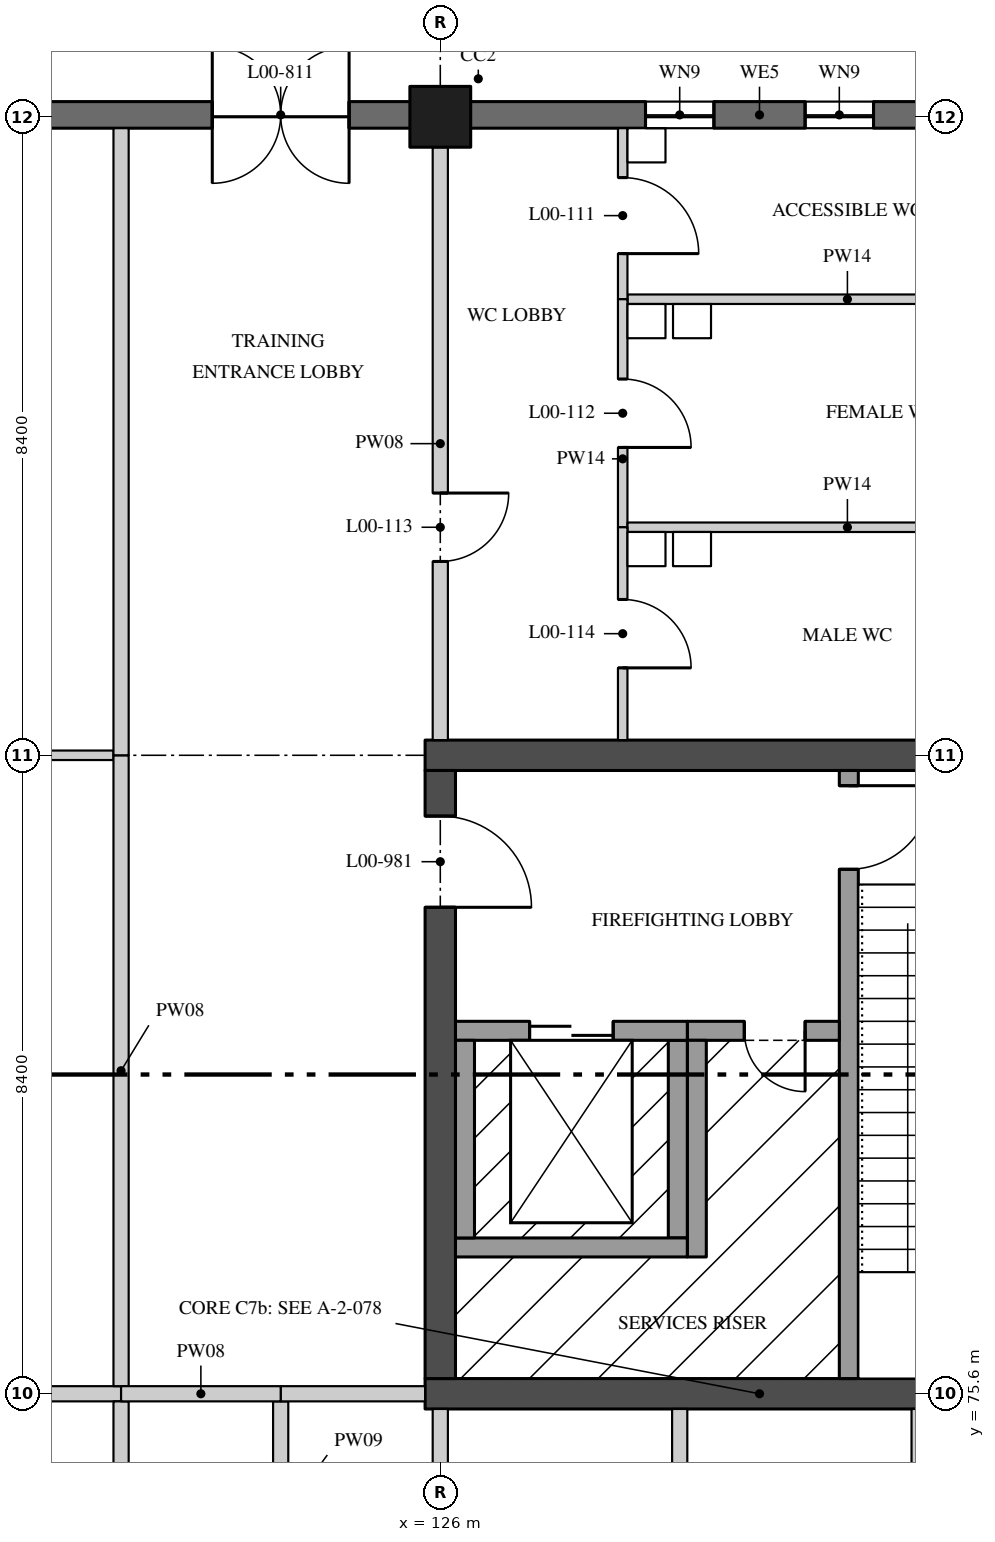
"""IFC4 building model, lengths in metres.
Left out: names, types, materials, properties, quantities, classifications, styles, units other than length and angle.
Written with IfcOpenShell. Run it as: python <this file> out.ifc"""

import sys

from ifc_helpers import new_model, si_unit, direction, frame, frame_2d, origin, origin_2d, place, context, subcontext, project, spatial, rectangle, extrude, element, fill, save


model = new_model("IFC4")
c1 = context("Model", 3, precision=1e-05, world=origin(), true_north=direction((0.0, 1.0)))
c2 = subcontext(c1, "Body", "Model", "MODEL_VIEW")
j1 = project(units=[si_unit("LENGTHUNIT", "METRE"), si_unit("PLANEANGLEUNIT", "RADIAN")], contexts=[c1])
p1 = place(None, origin())
s1 = spatial("IfcSite", under=j1, at=p1, CompositionType="ELEMENT")
p2 = place(p1, origin())
s2 = spatial("IfcBuilding", under=s1, at=p2, CompositionType="ELEMENT")
p3 = place(p2, origin())
s3 = spatial("IfcBuildingStorey", under=s2, at=p3, CompositionType="ELEMENT", Elevation=0.0)
p4 = place(p3, frame((126.0, 92.4, 0.0), z_axis=(0.0, 0.0, 1.0), x_axis=(1.0, 0.0, 0.0)))
e1 = element("IfcColumn", 1, at=p4, inside=s3, PredefinedType="COLUMN", context=c2, shape_type="SweptSolid", body=[
    extrude(rectangle(XDim=0.8, YDim=0.8, at=origin_2d()), origin(), (0.0, 0.0, 1.0), 5.05),
])
for number, where, z_axis, x_axis in (
    (2, (125.8, 75.6, 0.0), (0.0, 0.0, 1.0), (1.0, 0.0, 0.0)),
    (3, (125.8, 84.0, 0.0), (0.0, 0.0, 1.0), (1.0, 0.0, 0.0)),
):
    element("IfcWall", number, at=place(p3, frame(where, z_axis=z_axis, x_axis=x_axis)), inside=s3, PredefinedType="SHEAR", context=c2, shape_type="SweptSolid", body=[
        extrude(rectangle(XDim=8.8, YDim=0.4, at=frame_2d((4.4, 0.0))), origin(), (0.0, 0.0, 1.0), 5.05),
    ])
p5 = place(p3, frame((126.0, 75.8, 0.0), z_axis=(0.0, 0.0, 1.0), x_axis=(0.0, 1.0, 0.0)))
e4 = element("IfcWall", 4, at=p5, inside=s3, PredefinedType="SHEAR", context=c2, shape_type="SweptSolid", body=[
    extrude(rectangle(XDim=8.0, YDim=0.4, at=frame_2d((4.0, 0.0))), origin(), (0.0, 0.0, 1.0), 5.05),
])
p6 = place(p5, frame((6.2, 0.0, 0.0)))
e5 = element("IfcOpeningElement", 5, at=p6, cuts=e4, PredefinedType="OPENING", context=c2, shape_type="SweptSolid", body=[
    extrude(rectangle(XDim=1.2, YDim=2.1, at=frame_2d((0.6, 1.05))), frame((0.0, 0.21, 0.0), z_axis=(0.0, -1.0, 0.0), x_axis=(1.0, 0.0, 0.0)), (0.0, 0.0, 1.0), 0.42),
])
p7 = place(p3, frame((131.375, 83.8, 0.0), z_axis=(0.0, 0.0, 1.0), x_axis=(0.0, -1.0, 0.0)))
e6 = element("IfcWall", 6, at=p7, inside=s3, PredefinedType="SOLIDWALL", context=c2, shape_type="SweptSolid", body=[
    extrude(rectangle(XDim=8.0, YDim=0.25, at=frame_2d((4.0, 0.0))), origin(), (0.0, 0.0, 1.0), 5.05),
])
p8 = place(p7, frame((0.2, 0.0, 0.0)))
e7 = element("IfcOpeningElement", 7, at=p8, cuts=e6, PredefinedType="OPENING", context=c2, shape_type="SweptSolid", body=[
    extrude(rectangle(XDim=1.1, YDim=2.1, at=frame_2d((0.55, 1.05))), frame((0.0, 0.135, 0.0), z_axis=(0.0, -1.0, 0.0), x_axis=(1.0, 0.0, 0.0)), (0.0, 0.0, 1.0), 0.27),
])
p9 = place(p3, frame((131.25, 80.375, 0.0), z_axis=(0.0, 0.0, 1.0), x_axis=(-1.0, 0.0, 0.0)))
e8 = element("IfcWall", 8, at=p9, inside=s3, PredefinedType="SOLIDWALL", context=c2, shape_type="SweptSolid", body=[
    extrude(rectangle(XDim=2.0, YDim=0.25, at=frame_2d((1.0, 0.0))), origin(), (0.0, 0.0, 1.0), 5.05),
])
p10 = place(p9, frame((0.45, 0.0, 0.0)))
e9 = element("IfcOpeningElement", 9, at=p10, cuts=e8, PredefinedType="OPENING", context=c2, shape_type="SweptSolid", body=[
    extrude(rectangle(XDim=0.8, YDim=2.1, at=frame_2d((0.4, 1.05))), frame((0.0, 0.135, 0.0), z_axis=(0.0, -1.0, 0.0), x_axis=(1.0, 0.0, 0.0)), (0.0, 0.0, 1.0), 0.27),
])
p11 = place(p3, frame((129.375, 80.25, 0.0), z_axis=(0.0, 0.0, 1.0), x_axis=(0.0, -1.0, 0.0)))
e10 = element("IfcWall", 10, at=p11, inside=s3, PredefinedType="SOLIDWALL", context=c2, shape_type="SweptSolid", body=[
    extrude(rectangle(XDim=2.85, YDim=0.25, at=frame_2d((1.425, 0.0))), origin(), (0.0, 0.0, 1.0), 5.05),
])
p12 = place(p3, frame((129.125, 77.65, 0.0), z_axis=(0.0, 0.0, 1.0), x_axis=(0.0, 1.0, 0.0)))
e11 = element("IfcWall", 11, at=p12, inside=s3, PredefinedType="SOLIDWALL", context=c2, shape_type="SweptSolid", body=[
    extrude(rectangle(XDim=2.6, YDim=0.25, at=frame_2d((1.3, 0.0))), origin(), (0.0, 0.0, 1.0), 5.05),
])
p13 = place(p3, frame((126.2, 80.375, 0.0), z_axis=(0.0, 0.0, 1.0), x_axis=(1.0, 0.0, 0.0)))
e12 = element("IfcWall", 12, at=p13, inside=s3, PredefinedType="SOLIDWALL", context=c2, shape_type="SweptSolid", body=[
    extrude(rectangle(XDim=3.05, YDim=0.25, at=frame_2d((1.525, 0.0))), origin(), (0.0, 0.0, 1.0), 5.05),
])
p14 = place(p13, frame((0.975, 0.0, 0.0)))
e13 = element("IfcOpeningElement", 13, at=p14, cuts=e12, PredefinedType="OPENING", context=c2, shape_type="SweptSolid", body=[
    extrude(rectangle(XDim=1.1, YDim=2.1, at=frame_2d((0.55, 1.05))), frame((0.0, 0.135, 0.0), z_axis=(0.0, -1.0, 0.0), x_axis=(1.0, 0.0, 0.0)), (0.0, 0.0, 1.0), 0.27),
])
p15 = place(p3, frame((126.2, 77.525, 0.0), z_axis=(0.0, 0.0, 1.0), x_axis=(1.0, 0.0, 0.0)))
e14 = element("IfcWall", 14, at=p15, inside=s3, PredefinedType="SOLIDWALL", context=c2, shape_type="SweptSolid", body=[
    extrude(rectangle(XDim=3.05, YDim=0.25, at=frame_2d((1.525, 0.0))), origin(), (0.0, 0.0, 1.0), 5.05),
])
p16 = place(p3, frame((126.325, 77.65, 0.0), z_axis=(0.0, 0.0, 1.0), x_axis=(0.0, 1.0, 0.0)))
e15 = element("IfcWall", 15, at=p16, inside=s3, PredefinedType="SOLIDWALL", context=c2, shape_type="SweptSolid", body=[
    extrude(rectangle(XDim=2.6, YDim=0.25, at=frame_2d((1.3, 0.0))), origin(), (0.0, 0.0, 1.0), 5.05),
])
p17 = place(p3, frame((119.7, 75.6, 0.0), z_axis=(0.0, 0.0, 1.0), x_axis=(1.0, 0.0, 0.0)))
e16 = element("IfcWall", 16, at=p17, inside=s3, PredefinedType="PARTITIONING", context=c2, shape_type="SweptSolid", body=[
    extrude(rectangle(XDim=2.1, YDim=0.2, at=frame_2d((1.05, 0.0))), origin(), (0.0, 0.0, 1.0), 5.05),
])
p18 = place(p3, frame((118.0, 84.0, 0.0), z_axis=(0.0, 0.0, 1.0), x_axis=(1.0, 0.0, 0.0)))
e17 = element("IfcWall", 17, at=p18, inside=s3, PredefinedType="PARTITIONING", context=c2, shape_type="SweptSolid", body=[
    extrude(rectangle(XDim=3.7, YDim=0.125, at=frame_2d((1.85, 0.0))), origin(), (0.0, 0.0, 1.0), 5.05),
])
p19 = place(p3, frame((121.8, 75.7, 0.0), z_axis=(0.0, 0.0, 1.0), x_axis=(0.0, 1.0, 0.0)))
e18 = element("IfcWall", 18, at=p19, inside=s3, PredefinedType="PARTITIONING", context=c2, shape_type="SweptSolid", body=[
    extrude(rectangle(XDim=8.3, YDim=0.2, at=frame_2d((4.15, 0.0))), origin(), (0.0, 0.0, 1.0), 5.05),
])
p20 = place(p3, frame((123.9, 72.4, 0.0), z_axis=(0.0, 0.0, 1.0), x_axis=(0.0, 1.0, 0.0)))
e19 = element("IfcWall", 19, at=p20, inside=s3, PredefinedType="PARTITIONING", context=c2, shape_type="SweptSolid", body=[
    extrude(rectangle(XDim=3.1, YDim=0.2, at=frame_2d((1.55, 0.0))), origin(), (0.0, 0.0, 1.0), 5.05),
])
p21 = place(p3, frame((126.0, 72.4, 0.0), z_axis=(0.0, 0.0, 1.0), x_axis=(0.0, 1.0, 0.0)))
e20 = element("IfcWall", 20, at=p21, inside=s3, PredefinedType="PARTITIONING", context=c2, shape_type="SweptSolid", body=[
    extrude(rectangle(XDim=3.0, YDim=0.2, at=frame_2d((1.5, 0.0))), origin(), (0.0, 0.0, 1.0), 5.05),
])
p22 = place(p3, frame((123.9, 75.6, 0.0), z_axis=(0.0, 0.0, 1.0), x_axis=(1.0, 0.0, 0.0)))
e21 = element("IfcWall", 21, at=p22, inside=s3, PredefinedType="PARTITIONING", context=c2, shape_type="SweptSolid", body=[
    extrude(rectangle(XDim=1.9, YDim=0.2, at=frame_2d((0.95, 0.0))), origin(), (0.0, 0.0, 1.0), 5.05),
])
p23 = place(p3, frame((121.8, 72.4, 0.0), z_axis=(0.0, 0.0, 1.0), x_axis=(0.0, 1.0, 0.0)))
e22 = element("IfcWall", 22, at=p23, inside=s3, PredefinedType="PARTITIONING", context=c2, shape_type="SweptSolid", body=[
    extrude(rectangle(XDim=3.1, YDim=0.2, at=frame_2d((1.55, 0.0))), origin(), (0.0, 0.0, 1.0), 5.05),
])
p24 = place(p3, frame((121.8, 75.6, 0.0), z_axis=(0.0, 0.0, 1.0), x_axis=(1.0, 0.0, 0.0)))
e23 = element("IfcWall", 23, at=p24, inside=s3, PredefinedType="PARTITIONING", context=c2, shape_type="SweptSolid", body=[
    extrude(rectangle(XDim=2.1, YDim=0.2, at=frame_2d((1.05, 0.0))), origin(), (0.0, 0.0, 1.0), 5.05),
])
for number, where, z_axis, x_axis in (
    (24, (129.15, 72.4, 0.0), (0.0, 0.0, 1.0), (0.0, 1.0, 0.0)),
    (25, (132.3, 72.4, 0.0), (0.0, 0.0, 1.0), (0.0, 1.0, 0.0)),
):
    element("IfcWall", number, at=place(p3, frame(where, z_axis=z_axis, x_axis=x_axis)), inside=s3, PredefinedType="PARTITIONING", context=c2, shape_type="SweptSolid", body=[
        extrude(rectangle(XDim=3.0, YDim=0.2, at=frame_2d((1.5, 0.0))), origin(), (0.0, 0.0, 1.0), 5.05),
    ])
p25 = place(p3, frame((121.8, 84.0, 0.0), z_axis=(0.0, 0.0, 1.0), x_axis=(0.0, 1.0, 0.0)))
e26 = element("IfcWall", 26, at=p25, inside=s3, PredefinedType="PARTITIONING", context=c2, shape_type="SweptSolid", body=[
    extrude(rectangle(XDim=8.25, YDim=0.2, at=frame_2d((4.125, 0.0))), origin(), (0.0, 0.0, 1.0), 5.05),
])
p26 = place(p3, frame((126.0, 84.2, 0.0), z_axis=(0.0, 0.0, 1.0), x_axis=(0.0, 1.0, 0.0)))
e27 = element("IfcWall", 27, at=p26, inside=s3, PredefinedType="PARTITIONING", context=c2, shape_type="SweptSolid", body=[
    extrude(rectangle(XDim=7.8, YDim=0.2, at=frame_2d((3.9, 0.0))), origin(), (0.0, 0.0, 1.0), 5.05),
])
p27 = place(p26, frame((2.35, 0.0, 0.0)))
e28 = element("IfcOpeningElement", 28, at=p27, cuts=e27, PredefinedType="OPENING", context=c2, shape_type="SweptSolid", body=[
    extrude(rectangle(XDim=0.9, YDim=2.1, at=frame_2d((0.45, 1.05))), frame((0.0, 0.11, 0.0), z_axis=(0.0, -1.0, 0.0), x_axis=(1.0, 0.0, 0.0)), (0.0, 0.0, 1.0), 0.22),
])
p28 = place(p3, frame((128.463, 90.0, 0.0), z_axis=(0.0, 0.0, 1.0), x_axis=(1.0, 0.0, 0.0)))
e29 = element("IfcWall", 29, at=p28, inside=s3, PredefinedType="PARTITIONING", context=c2, shape_type="SweptSolid", body=[
    extrude(rectangle(XDim=5.787, YDim=0.125, at=frame_2d((2.894, 0.0))), origin(), (0.0, 0.0, 1.0), 5.05),
])
p29 = place(p3, frame((128.4, 90.0, 0.0), z_axis=(0.0, 0.0, 1.0), x_axis=(0.0, 1.0, 0.0)))
e30 = element("IfcWall", 30, at=p29, inside=s3, PredefinedType="PARTITIONING", context=c2, shape_type="SweptSolid", body=[
    extrude(rectangle(XDim=2.25, YDim=0.125, at=frame_2d((1.125, 0.0))), origin(), (0.0, 0.0, 1.0), 5.05),
])
p30 = place(p29, frame((0.6, 0.0, 0.0)))
e31 = element("IfcOpeningElement", 31, at=p30, cuts=e30, PredefinedType="OPENING", context=c2, shape_type="SweptSolid", body=[
    extrude(rectangle(XDim=1.0, YDim=2.1, at=frame_2d((0.5, 1.05))), frame((0.0, 0.073, 0.0), z_axis=(0.0, -1.0, 0.0), x_axis=(1.0, 0.0, 0.0)), (0.0, 0.0, 1.0), 0.145),
])
p31 = place(p3, frame((128.4, 87.0, 0.0), z_axis=(0.0, 0.0, 1.0), x_axis=(0.0, 1.0, 0.0)))
e32 = element("IfcWall", 32, at=p31, inside=s3, PredefinedType="PARTITIONING", context=c2, shape_type="SweptSolid", body=[
    extrude(rectangle(XDim=3.0, YDim=0.125, at=frame_2d((1.5, 0.0))), origin(), (0.0, 0.0, 1.0), 5.05),
])
p32 = place(p31, frame((1.05, 0.0, 0.0)))
e33 = element("IfcOpeningElement", 33, at=p32, cuts=e32, PredefinedType="OPENING", context=c2, shape_type="SweptSolid", body=[
    extrude(rectangle(XDim=0.9, YDim=2.1, at=frame_2d((0.45, 1.05))), frame((0.0, 0.073, 0.0), z_axis=(0.0, -1.0, 0.0), x_axis=(1.0, 0.0, 0.0)), (0.0, 0.0, 1.0), 0.145),
])
p33 = place(p3, frame((128.463, 87.0, 0.0), z_axis=(0.0, 0.0, 1.0), x_axis=(1.0, 0.0, 0.0)))
e34 = element("IfcWall", 34, at=p33, inside=s3, PredefinedType="PARTITIONING", context=c2, shape_type="SweptSolid", body=[
    extrude(rectangle(XDim=5.787, YDim=0.125, at=frame_2d((2.894, 0.0))), origin(), (0.0, 0.0, 1.0), 5.05),
])
p34 = place(p3, frame((128.4, 84.2, 0.0), z_axis=(0.0, 0.0, 1.0), x_axis=(0.0, 1.0, 0.0)))
e35 = element("IfcWall", 35, at=p34, inside=s3, PredefinedType="PARTITIONING", context=c2, shape_type="SweptSolid", body=[
    extrude(rectangle(XDim=2.8, YDim=0.125, at=frame_2d((1.4, 0.0))), origin(), (0.0, 0.0, 1.0), 5.05),
])
p35 = place(p34, frame((0.95, 0.0, 0.0)))
e36 = element("IfcOpeningElement", 36, at=p35, cuts=e35, PredefinedType="OPENING", context=c2, shape_type="SweptSolid", body=[
    extrude(rectangle(XDim=0.9, YDim=2.1, at=frame_2d((0.45, 1.05))), frame((0.0, 0.073, 0.0), z_axis=(0.0, -1.0, 0.0), x_axis=(1.0, 0.0, 0.0)), (0.0, 0.0, 1.0), 0.145),
])
p36 = place(p3, frame((134.02, 92.425, 0.0), z_axis=(0.0, 0.0, 1.0), x_axis=(-1.0, 0.0, 0.0)))
e37 = element("IfcWall", 37, at=p36, inside=s3, PredefinedType="SOLIDWALL", context=c2, shape_type="SweptSolid", body=[
    extrude(rectangle(XDim=7.64, YDim=0.35, at=frame_2d((3.82, 0.0))), origin(), (0.0, 0.0, 1.0), 5.05),
])
p37 = place(p36, frame((2.32, 0.0, 1.5)))
e38 = element("IfcOpeningElement", 38, at=p37, cuts=e37, PredefinedType="OPENING", context=c2, shape_type="SweptSolid", body=[
    extrude(rectangle(XDim=0.9, YDim=1.2, at=frame_2d((0.45, 0.6))), frame((0.0, 0.185, 0.0), z_axis=(0.0, -1.0, 0.0), x_axis=(1.0, 0.0, 0.0)), (0.0, 0.0, 1.0), 0.37),
])
p38 = place(p36, frame((4.42, 0.0, 1.5)))
e39 = element("IfcOpeningElement", 39, at=p38, cuts=e37, PredefinedType="OPENING", context=c2, shape_type="SweptSolid", body=[
    extrude(rectangle(XDim=0.9, YDim=1.2, at=frame_2d((0.45, 0.6))), frame((0.0, 0.185, 0.0), z_axis=(0.0, -1.0, 0.0), x_axis=(1.0, 0.0, 0.0)), (0.0, 0.0, 1.0), 0.37),
])
p39 = place(p3, frame((125.62, 92.425, 0.0), z_axis=(0.0, 0.0, 1.0), x_axis=(-1.0, 0.0, 0.0)))
e40 = element("IfcWall", 40, at=p39, inside=s3, PredefinedType="SOLIDWALL", context=c2, shape_type="SweptSolid", body=[
    extrude(rectangle(XDim=7.64, YDim=0.35, at=frame_2d((3.82, 0.0))), origin(), (0.0, 0.0, 1.0), 5.05),
])
p40 = place(p39, frame((0.82, 0.0, 0.0)))
e41 = element("IfcOpeningElement", 41, at=p40, cuts=e40, PredefinedType="OPENING", context=c2, shape_type="SweptSolid", body=[
    extrude(rectangle(XDim=1.8, YDim=2.4, at=frame_2d((0.9, 1.2))), frame((0.0, 0.185, 0.0), z_axis=(0.0, -1.0, 0.0), x_axis=(1.0, 0.0, 0.0)), (0.0, 0.0, 1.0), 0.37),
])
p41 = place(p6, frame((1.2, 0.0, 0.0), z_axis=(0.0, 0.0, 1.0), x_axis=(-1.0, 0.0, 0.0)))
e42 = element("IfcDoor", 42, at=p41, inside=s3, OperationType="SINGLE_SWING_LEFT", PredefinedType="DOOR", context=c2, shape_type="SweptSolid", body=[
    extrude(rectangle(XDim=1.2, YDim=2.1, at=frame_2d((0.6, 1.05))), frame((0.0, 0.035, 0.0), z_axis=(0.0, -1.0, 0.0), x_axis=(1.0, 0.0, 0.0)), (0.0, 0.0, 1.0), 0.07),
])
fill(e5, e42)
p42 = place(p10, origin())
e43 = element("IfcDoor", 43, at=p42, inside=s3, OperationType="SINGLE_SWING_RIGHT", PredefinedType="DOOR", context=c2, shape_type="SweptSolid", body=[
    extrude(rectangle(XDim=0.8, YDim=2.1, at=frame_2d((0.4, 1.05))), frame((0.0, 0.035, 0.0), z_axis=(0.0, -1.0, 0.0), x_axis=(1.0, 0.0, 0.0)), (0.0, 0.0, 1.0), 0.07),
])
fill(e9, e43)
p43 = place(p8, origin())
e44 = element("IfcDoor", 44, at=p43, inside=s3, OperationType="SINGLE_SWING_RIGHT", PredefinedType="DOOR", context=c2, shape_type="SweptSolid", body=[
    extrude(rectangle(XDim=1.1, YDim=2.1, at=frame_2d((0.55, 1.05))), frame((0.0, 0.035, 0.0), z_axis=(0.0, -1.0, 0.0), x_axis=(1.0, 0.0, 0.0)), (0.0, 0.0, 1.0), 0.07),
])
fill(e7, e44)
p44 = place(p14, origin())
e45 = element("IfcDoor", 45, at=p44, inside=s3, OperationType="DOUBLE_DOOR_SLIDING", PredefinedType="DOOR", context=c2, shape_type="SweptSolid", body=[
    extrude(rectangle(XDim=1.1, YDim=2.1, at=frame_2d((0.55, 1.05))), frame((0.0, 0.04, 0.0), z_axis=(0.0, -1.0, 0.0), x_axis=(1.0, 0.0, 0.0)), (0.0, 0.0, 1.0), 0.08),
])
fill(e13, e45)
p45 = place(p30, frame((1.0, 0.0, 0.0), z_axis=(0.0, 0.0, 1.0), x_axis=(-1.0, 0.0, 0.0)))
e46 = element("IfcDoor", 46, at=p45, inside=s3, OperationType="SINGLE_SWING_LEFT", PredefinedType="DOOR", context=c2, shape_type="SweptSolid", body=[
    extrude(rectangle(XDim=1.0, YDim=2.1, at=frame_2d((0.5, 1.05))), frame((0.0, 0.02, 0.0), z_axis=(0.0, -1.0, 0.0), x_axis=(1.0, 0.0, 0.0)), (0.0, 0.0, 1.0), 0.04),
])
fill(e31, e46)
p46 = place(p32, frame((0.9, 0.0, 0.0), z_axis=(0.0, 0.0, 1.0), x_axis=(-1.0, 0.0, 0.0)))
e47 = element("IfcDoor", 47, at=p46, inside=s3, OperationType="SINGLE_SWING_LEFT", PredefinedType="DOOR", context=c2, shape_type="SweptSolid", body=[
    extrude(rectangle(XDim=0.9, YDim=2.1, at=frame_2d((0.45, 1.05))), frame((0.0, 0.02, 0.0), z_axis=(0.0, -1.0, 0.0), x_axis=(1.0, 0.0, 0.0)), (0.0, 0.0, 1.0), 0.04),
])
fill(e33, e47)
p47 = place(p27, frame((0.9, 0.0, 0.0), z_axis=(0.0, 0.0, 1.0), x_axis=(-1.0, 0.0, 0.0)))
e48 = element("IfcDoor", 48, at=p47, inside=s3, OperationType="SINGLE_SWING_RIGHT", PredefinedType="DOOR", context=c2, shape_type="SweptSolid", body=[
    extrude(rectangle(XDim=0.9, YDim=2.1, at=frame_2d((0.45, 1.05))), frame((0.0, 0.03, 0.0), z_axis=(0.0, -1.0, 0.0), x_axis=(1.0, 0.0, 0.0)), (0.0, 0.0, 1.0), 0.06),
])
fill(e28, e48)
p48 = place(p35, frame((0.9, 0.0, 0.0), z_axis=(0.0, 0.0, 1.0), x_axis=(-1.0, 0.0, 0.0)))
e49 = element("IfcDoor", 49, at=p48, inside=s3, OperationType="SINGLE_SWING_LEFT", PredefinedType="DOOR", context=c2, shape_type="SweptSolid", body=[
    extrude(rectangle(XDim=0.9, YDim=2.1, at=frame_2d((0.45, 1.05))), frame((0.0, 0.02, 0.0), z_axis=(0.0, -1.0, 0.0), x_axis=(1.0, 0.0, 0.0)), (0.0, 0.0, 1.0), 0.04),
])
fill(e36, e49)
p49 = place(p37, origin())
e50 = element("IfcWindow", 50, at=p49, inside=s3, PartitioningType="SINGLE_PANEL", PredefinedType="WINDOW", context=c2, shape_type="SweptSolid", body=[
    extrude(rectangle(XDim=0.9, YDim=1.2, at=frame_2d((0.45, 0.6))), frame((0.0, 0.05, 0.0), z_axis=(0.0, -1.0, 0.0), x_axis=(1.0, 0.0, 0.0)), (0.0, 0.0, 1.0), 0.1),
])
fill(e38, e50)
p50 = place(p38, origin())
e51 = element("IfcWindow", 51, at=p50, inside=s3, PartitioningType="SINGLE_PANEL", PredefinedType="WINDOW", context=c2, shape_type="SweptSolid", body=[
    extrude(rectangle(XDim=0.9, YDim=1.2, at=frame_2d((0.45, 0.6))), frame((0.0, 0.05, 0.0), z_axis=(0.0, -1.0, 0.0), x_axis=(1.0, 0.0, 0.0)), (0.0, 0.0, 1.0), 0.1),
])
fill(e39, e51)
p51 = place(p40, frame((1.8, 0.0, 0.0), z_axis=(0.0, 0.0, 1.0), x_axis=(-1.0, 0.0, 0.0)))
e52 = element("IfcDoor", 52, at=p51, inside=s3, OperationType="DOUBLE_DOOR_DOUBLE_SWING", PredefinedType="DOOR", context=c2, shape_type="SweptSolid", body=[
    extrude(rectangle(XDim=1.8, YDim=2.4, at=frame_2d((0.9, 1.2))), frame((0.0, 0.025, 0.0), z_axis=(0.0, -1.0, 0.0), x_axis=(1.0, 0.0, 0.0)), (0.0, 0.0, 1.0), 0.05),
])
fill(e41, e52)
save(model, sys.argv[1])
